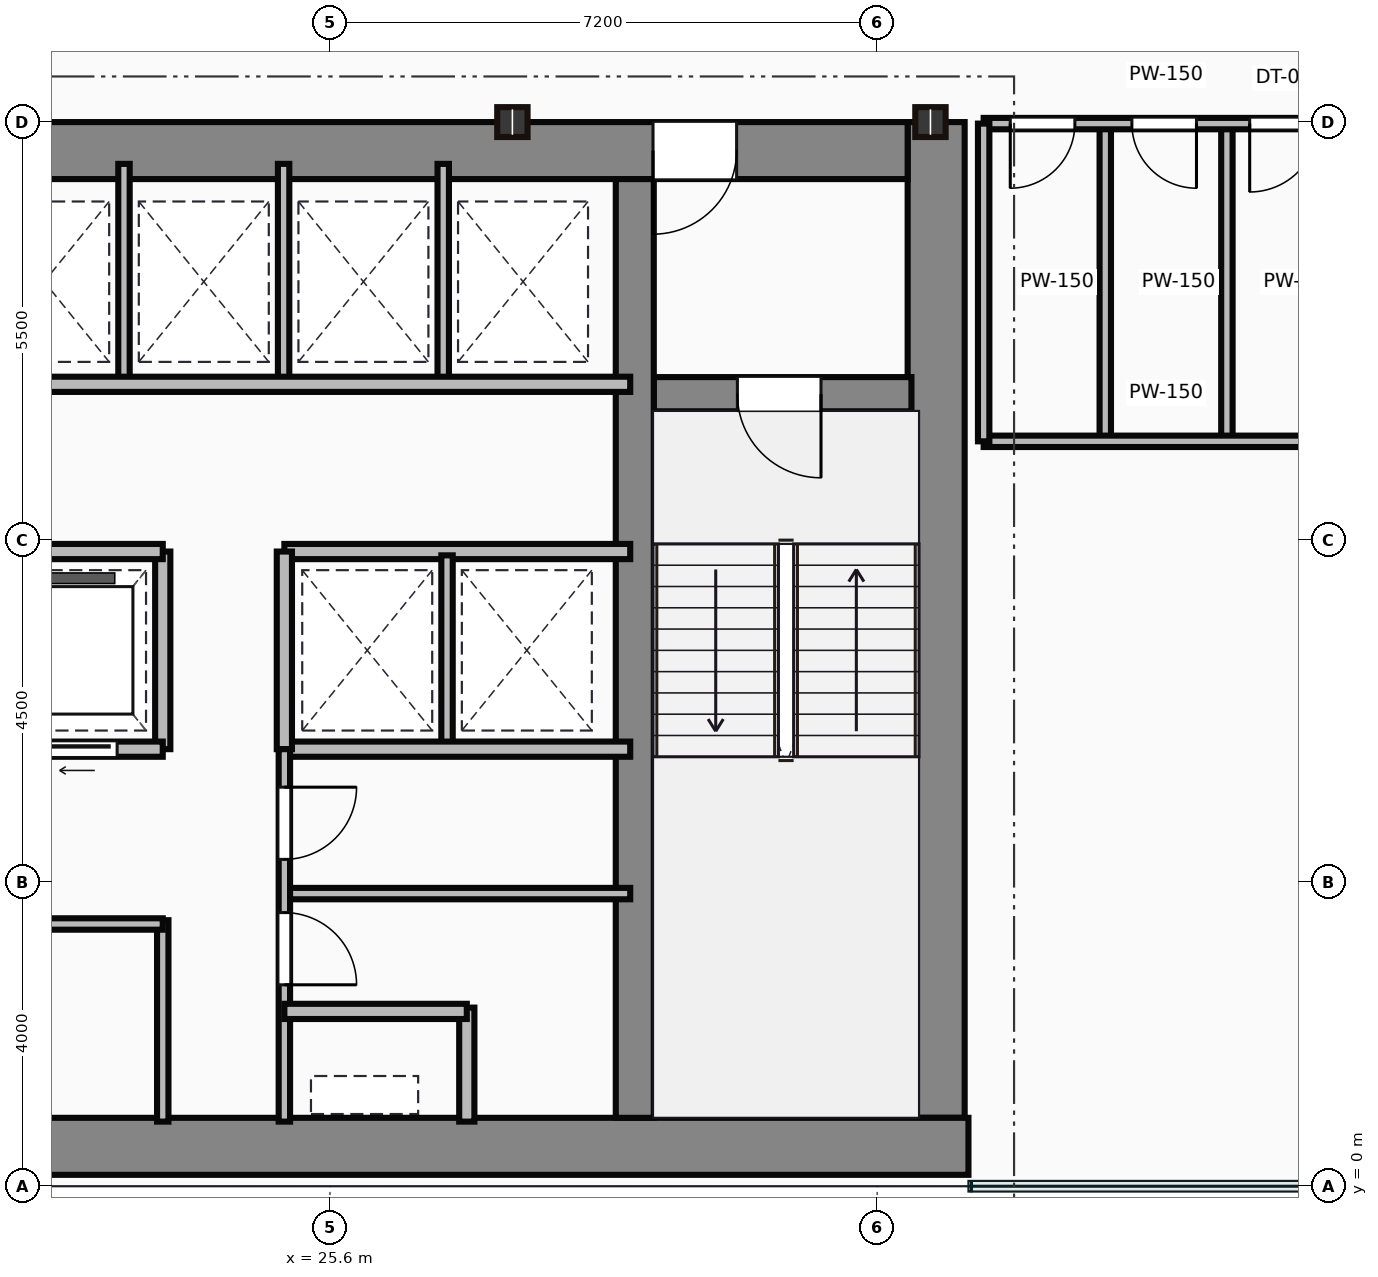
"""IFC4 building model, lengths in metres.
Left out: names, types, materials, properties, quantities, classifications, styles, units other than length and angle.
Written with IfcOpenShell. Run it as: python <this file> out.ifc"""

import sys

from ifc_helpers import new_model, si_unit, direction, frame, frame_2d, origin, origin_2d, place, context, subcontext, project, spatial, rectangle, i_section, extrude, source, transform, mapped, element, fill, save


model = new_model("IFC4")
c1 = context("Model", 3, precision=1e-05, world=origin(), true_north=direction((0.0, 1.0)))
c2 = subcontext(c1, "Body", "Model", "MODEL_VIEW")
j1 = project(units=[si_unit("LENGTHUNIT", "METRE"), si_unit("PLANEANGLEUNIT", "RADIAN")], contexts=[c1])
p1 = place(None, origin())
s1 = spatial("IfcSite", under=j1, at=p1, CompositionType="ELEMENT")
p2 = place(p1, origin())
s2 = spatial("IfcBuilding", under=s1, at=p2, CompositionType="ELEMENT")
p3 = place(p2, frame((0.0, 0.0, 125.15)))
s3 = spatial("IfcBuildingStorey", under=s2, at=p3, CompositionType="ELEMENT", Elevation=125.15)
m1 = source(origin(), c2, "Body", "SweptSolid", [
    extrude(rectangle(XDim=29.5, YDim=0.75, at=frame_2d((14.75, 0.0))), origin(), (0.0, 0.0, 1.0), 3.65),
])
p4 = place(p3, frame((4.5, 0.525, 0.0), z_axis=(0.0, 0.0, 1.0), x_axis=(1.0, 0.0, 0.0)))
e1 = element("IfcWall", 1, at=p4, inside=s3, PredefinedType="SHEAR", context=c2, shape_type="MappedRepresentation", body=[
    mapped(m1, transform((0.0, 0.0, 0.0))),
])
m2 = source(origin(), c2, "Body", "SweptSolid", [
    extrude(rectangle(XDim=13.1, YDim=0.75, at=frame_2d((6.55, 0.0))), origin(), (0.0, 0.0, 1.0), 3.65),
])
p5 = place(p3, frame((33.575, 0.9, 0.0), z_axis=(0.0, 0.0, 1.0), x_axis=(0.0, 1.0, 0.0)))
e2 = element("IfcWall", 2, at=p5, inside=s3, PredefinedType="SHEAR", context=c2, shape_type="MappedRepresentation", body=[
    mapped(m2, transform((0.0, 0.0, 0.0))),
])
m3 = source(origin(), c2, "Body", "SweptSolid", [
    extrude(rectangle(XDim=12.6, YDim=0.75, at=frame_2d((6.3, 0.0))), origin(), (0.0, 0.0, 1.0), 3.65),
])
p6 = place(p3, frame((20.6, 13.625, 0.0), z_axis=(0.0, 0.0, 1.0), x_axis=(1.0, 0.0, 0.0)))
e3 = element("IfcWall", 3, at=p6, inside=s3, PredefinedType="SHEAR", context=c2, shape_type="MappedRepresentation", body=[
    mapped(m3, transform((0.0, 0.0, 0.0))),
])
p7 = place(p6, frame((9.25, 0.0, 0.0)))
e4 = element("IfcOpeningElement", 4, at=p7, cuts=e3, PredefinedType="OPENING", context=c2, shape_type="SweptSolid", body=[
    extrude(rectangle(XDim=1.1, YDim=2.15, at=frame_2d((0.55, 1.075))), frame((0.0, 0.385, 0.0), z_axis=(0.0, -1.0, 0.0), x_axis=(1.0, 0.0, 0.0)), (0.0, 0.0, 1.0), 0.77),
])
m4 = source(origin(), c2, "Body", "SweptSolid", [
    extrude(rectangle(XDim=12.35, YDim=0.5, at=frame_2d((6.175, 0.0))), origin(), (0.0, 0.0, 1.0), 3.65),
])
p8 = place(p3, frame((29.61, 0.9, 0.0), z_axis=(0.0, 0.0, 1.0), x_axis=(0.0, 1.0, 0.0)))
e5 = element("IfcWall", 5, at=p8, inside=s3, PredefinedType="SHEAR", context=c2, shape_type="MappedRepresentation", body=[
    mapped(m4, transform((0.0, 0.0, 0.0))),
])
m5 = source(origin(), c2, "Body", "SweptSolid", [
    extrude(rectangle(XDim=3.39, YDim=0.45, at=frame_2d((1.695, 0.0))), origin(), (0.0, 0.0, 1.0), 3.65),
])
p9 = place(p3, frame((29.86, 10.42, 0.0), z_axis=(0.0, 0.0, 1.0), x_axis=(1.0, 0.0, 0.0)))
e6 = element("IfcWall", 6, at=p9, inside=s3, PredefinedType="SHEAR", context=c2, shape_type="MappedRepresentation", body=[
    mapped(m5, transform((0.0, 0.0, 0.0))),
])
p10 = place(p9, frame((1.1, 0.0, 0.0)))
e7 = element("IfcOpeningElement", 7, at=p10, cuts=e6, PredefinedType="OPENING", context=c2, shape_type="SweptSolid", body=[
    extrude(rectangle(XDim=1.1, YDim=2.15, at=frame_2d((0.55, 1.075))), frame((0.0, 0.235, 0.0), z_axis=(0.0, -1.0, 0.0), x_axis=(1.0, 0.0, 0.0)), (0.0, 0.0, 1.0), 0.47),
])
m6 = source(origin(), c2, "Body", "SweptSolid", [
    extrude(i_section(OverallWidth=0.399, OverallDepth=0.393, WebThickness=0.023, FlangeThickness=0.037, at=origin_2d()), origin(), (0.0, 0.0, 1.0), 3.65),
])
for number, where, z_axis, x_axis in (
    (8, (28.0, 14.0, 0.0), (0.0, 0.0, 1.0), (1.0, 0.0, 0.0)),
    (9, (33.5, 14.0, 0.0), (0.0, 0.0, 1.0), (1.0, 0.0, 0.0)),
):
    element("IfcColumn", number, at=place(p3, frame(where, z_axis=z_axis, x_axis=x_axis)), inside=s3, PredefinedType="COLUMN", context=c2, shape_type="MappedRepresentation", body=[
        mapped(m6, transform((0.0, 0.0, 0.0))),
    ])
m7 = source(origin(), c2, "Body", "SweptSolid", [
    extrude(rectangle(XDim=10.35, YDim=0.15, at=frame_2d((5.175, 0.0))), origin(), (0.0, 0.0, 1.0), 3.4),
])
p11 = place(p3, frame((13.05, 3.45, 0.0), z_axis=(0.0, 0.0, 1.0), x_axis=(1.0, 0.0, 0.0)))
e10 = element("IfcWall", 10, at=p11, inside=s3, PredefinedType="PARTITIONING", context=c2, shape_type="MappedRepresentation", body=[
    mapped(m7, transform((0.0, 0.0, 0.0))),
])
p12 = place(p11, frame((2.1, 0.0, 0.0)))
e11 = element("IfcOpeningElement", 11, at=p12, cuts=e10, PredefinedType="OPENING", context=c2, shape_type="SweptSolid", body=[
    extrude(rectangle(XDim=0.95, YDim=2.15, at=frame_2d((0.475, 1.075))), frame((0.0, 0.085, 0.0), z_axis=(0.0, -1.0, 0.0), x_axis=(1.0, 0.0, 0.0)), (0.0, 0.0, 1.0), 0.17),
])
p13 = place(p11, frame((6.8, 0.0, 0.0)))
e12 = element("IfcOpeningElement", 12, at=p13, cuts=e10, PredefinedType="OPENING", context=c2, shape_type="SweptSolid", body=[
    extrude(rectangle(XDim=0.95, YDim=2.15, at=frame_2d((0.475, 1.075))), frame((0.0, 0.085, 0.0), z_axis=(0.0, -1.0, 0.0), x_axis=(1.0, 0.0, 0.0)), (0.0, 0.0, 1.0), 0.17),
])
m8 = source(origin(), c2, "Body", "SweptSolid", [
    extrude(rectangle(XDim=2.65, YDim=0.15, at=frame_2d((1.325, 0.0))), origin(), (0.0, 0.0, 1.0), 3.4),
])
p14 = place(p3, frame((23.4, 0.85, 0.0), z_axis=(0.0, 0.0, 1.0), x_axis=(0.0, 1.0, 0.0)))
e13 = element("IfcWall", 13, at=p14, inside=s3, PredefinedType="PARTITIONING", context=c2, shape_type="MappedRepresentation", body=[
    mapped(m8, transform((0.0, 0.0, 0.0))),
])
m9 = source(origin(), c2, "Body", "SweptSolid", [
    extrude(rectangle(XDim=11.85, YDim=0.2, at=frame_2d((5.925, 0.0))), origin(), (0.0, 0.0, 1.0), 3.4),
])
p15 = place(p3, frame((11.55, 5.75, 0.0), z_axis=(0.0, 0.0, 1.0), x_axis=(1.0, 0.0, 0.0)))
e14 = element("IfcWall", 14, at=p15, inside=s3, PredefinedType="PARTITIONING", context=c2, shape_type="MappedRepresentation", body=[
    mapped(m9, transform((0.0, 0.0, 0.0))),
])
p16 = place(p15, frame((0.45, 0.0, 0.0)))
e15 = element("IfcOpeningElement", 15, at=p16, cuts=e14, PredefinedType="OPENING", context=c2, shape_type="SweptSolid", body=[
    extrude(rectangle(XDim=1.05, YDim=2.15, at=frame_2d((0.525, 1.075))), frame((0.0, 0.11, 0.0), z_axis=(0.0, -1.0, 0.0), x_axis=(1.0, 0.0, 0.0)), (0.0, 0.0, 1.0), 0.22),
])
p17 = place(p15, frame((2.4, 0.0, 0.0)))
e16 = element("IfcOpeningElement", 16, at=p17, cuts=e14, PredefinedType="OPENING", context=c2, shape_type="SweptSolid", body=[
    extrude(rectangle(XDim=1.05, YDim=2.15, at=frame_2d((0.525, 1.075))), frame((0.0, 0.11, 0.0), z_axis=(0.0, -1.0, 0.0), x_axis=(1.0, 0.0, 0.0)), (0.0, 0.0, 1.0), 0.22),
])
p18 = place(p15, frame((4.35, 0.0, 0.0)))
e17 = element("IfcOpeningElement", 17, at=p18, cuts=e14, PredefinedType="OPENING", context=c2, shape_type="SweptSolid", body=[
    extrude(rectangle(XDim=1.05, YDim=2.15, at=frame_2d((0.525, 1.075))), frame((0.0, 0.11, 0.0), z_axis=(0.0, -1.0, 0.0), x_axis=(1.0, 0.0, 0.0)), (0.0, 0.0, 1.0), 0.22),
])
p19 = place(p15, frame((6.3, 0.0, 0.0)))
e18 = element("IfcOpeningElement", 18, at=p19, cuts=e14, PredefinedType="OPENING", context=c2, shape_type="SweptSolid", body=[
    extrude(rectangle(XDim=1.05, YDim=2.15, at=frame_2d((0.525, 1.075))), frame((0.0, 0.11, 0.0), z_axis=(0.0, -1.0, 0.0), x_axis=(1.0, 0.0, 0.0)), (0.0, 0.0, 1.0), 0.22),
])
p20 = place(p15, frame((8.25, 0.0, 0.0)))
e19 = element("IfcOpeningElement", 19, at=p20, cuts=e14, PredefinedType="OPENING", context=c2, shape_type="SweptSolid", body=[
    extrude(rectangle(XDim=1.05, YDim=2.15, at=frame_2d((0.525, 1.075))), frame((0.0, 0.11, 0.0), z_axis=(0.0, -1.0, 0.0), x_axis=(1.0, 0.0, 0.0)), (0.0, 0.0, 1.0), 0.22),
])
p21 = place(p15, frame((10.2, 0.0, 0.0)))
e20 = element("IfcOpeningElement", 20, at=p21, cuts=e14, PredefinedType="OPENING", context=c2, shape_type="SweptSolid", body=[
    extrude(rectangle(XDim=1.05, YDim=2.15, at=frame_2d((0.525, 1.075))), frame((0.0, 0.11, 0.0), z_axis=(0.0, -1.0, 0.0), x_axis=(1.0, 0.0, 0.0)), (0.0, 0.0, 1.0), 0.22),
])
p22 = place(p3, frame((11.55, 8.35, 0.0), z_axis=(0.0, 0.0, 1.0), x_axis=(1.0, 0.0, 0.0)))
e21 = element("IfcWall", 21, at=p22, inside=s3, PredefinedType="PARTITIONING", context=c2, shape_type="MappedRepresentation", body=[
    mapped(m9, transform((0.0, 0.0, 0.0))),
])
m10 = source(origin(), c2, "Body", "SweptSolid", [
    extrude(rectangle(XDim=2.6, YDim=0.2, at=frame_2d((1.3, 0.0))), origin(), (0.0, 0.0, 1.0), 3.4),
])
p23 = place(p3, frame((23.4, 5.75, 0.0), z_axis=(0.0, 0.0, 1.0), x_axis=(0.0, 1.0, 0.0)))
e22 = element("IfcWall", 22, at=p23, inside=s3, PredefinedType="PARTITIONING", context=c2, shape_type="MappedRepresentation", body=[
    mapped(m10, transform((0.0, 0.0, 0.0))),
])
m11 = source(origin(), c2, "Body", "SweptSolid", [
    extrude(rectangle(XDim=8.8, YDim=0.2, at=frame_2d((4.4, 0.0))), origin(), (0.0, 0.0, 1.0), 3.4),
])
p24 = place(p3, frame((20.75, 10.55, 0.0), z_axis=(0.0, 0.0, 1.0), x_axis=(1.0, 0.0, 0.0)))
e23 = element("IfcWall", 23, at=p24, inside=s3, PredefinedType="PARTITIONING", context=c2, shape_type="MappedRepresentation", body=[
    mapped(m11, transform((0.0, 0.0, 0.0))),
])
m12 = source(origin(), c2, "Body", "SweptSolid", [
    extrude(rectangle(XDim=2.85, YDim=0.15, at=frame_2d((1.425, 0.0))), origin(), (0.0, 0.0, 1.0), 3.4),
])
for number, where, z_axis, x_axis in (
    (24, (22.89, 10.6, 0.0), (0.0, 0.0, 1.0), (0.0, 1.0, 0.0)),
    (25, (24.99, 10.6, 0.0), (0.0, 0.0, 1.0), (0.0, 1.0, 0.0)),
    (26, (27.09, 10.6, 0.0), (0.0, 0.0, 1.0), (0.0, 1.0, 0.0)),
):
    element("IfcWall", number, at=place(p3, frame(where, z_axis=z_axis, x_axis=x_axis)), inside=s3, PredefinedType="PARTITIONING", context=c2, shape_type="MappedRepresentation", body=[
        mapped(m12, transform((0.0, 0.0, 0.0))),
    ])
m13 = source(origin(), c2, "Body", "SweptSolid", [
    extrude(rectangle(XDim=4.55, YDim=0.2, at=frame_2d((2.275, 0.0))), origin(), (0.0, 0.0, 1.0), 3.4),
])
for number, where, z_axis, x_axis in (
    (27, (25.0, 8.35, 0.0), (0.0, 0.0, 1.0), (1.0, 0.0, 0.0)),
    (28, (25.0, 5.75, 0.0), (0.0, 0.0, 1.0), (1.0, 0.0, 0.0)),
):
    element("IfcWall", number, at=place(p3, frame(where, z_axis=z_axis, x_axis=x_axis)), inside=s3, PredefinedType="PARTITIONING", context=c2, shape_type="MappedRepresentation", body=[
        mapped(m13, transform((0.0, 0.0, 0.0))),
    ])
p25 = place(p3, frame((25.0, 5.75, 0.0), z_axis=(0.0, 0.0, 1.0), x_axis=(0.0, 1.0, 0.0)))
e29 = element("IfcWall", 29, at=p25, inside=s3, PredefinedType="PARTITIONING", context=c2, shape_type="MappedRepresentation", body=[
    mapped(m10, transform((0.0, 0.0, 0.0))),
])
m14 = source(origin(), c2, "Body", "SweptSolid", [
    extrude(rectangle(XDim=2.5, YDim=0.15, at=frame_2d((1.25, 0.0))), origin(), (0.0, 0.0, 1.0), 3.4),
])
p26 = place(p3, frame((27.14, 5.8, 0.0), z_axis=(0.0, 0.0, 1.0), x_axis=(0.0, 1.0, 0.0)))
e30 = element("IfcWall", 30, at=p26, inside=s3, PredefinedType="PARTITIONING", context=c2, shape_type="MappedRepresentation", body=[
    mapped(m14, transform((0.0, 0.0, 0.0))),
])
m15 = source(origin(), c2, "Body", "SweptSolid", [
    extrude(rectangle(XDim=4.9, YDim=0.15, at=frame_2d((2.45, 0.0))), origin(), (0.0, 0.0, 1.0), 3.4),
])
p27 = place(p3, frame((25.0, 0.85, 0.0), z_axis=(0.0, 0.0, 1.0), x_axis=(0.0, 1.0, 0.0)))
e31 = element("IfcWall", 31, at=p27, inside=s3, PredefinedType="PARTITIONING", context=c2, shape_type="MappedRepresentation", body=[
    mapped(m15, transform((0.0, 0.0, 0.0))),
])
p28 = place(p27, frame((1.8, 0.0, 0.0)))
e32 = element("IfcOpeningElement", 32, at=p28, cuts=e31, PredefinedType="OPENING", context=c2, shape_type="SweptSolid", body=[
    extrude(rectangle(XDim=0.95, YDim=2.15, at=frame_2d((0.475, 1.075))), frame((0.0, 0.085, 0.0), z_axis=(0.0, -1.0, 0.0), x_axis=(1.0, 0.0, 0.0)), (0.0, 0.0, 1.0), 0.17),
])
p29 = place(p27, frame((3.45, 0.0, 0.0)))
e33 = element("IfcOpeningElement", 33, at=p29, cuts=e31, PredefinedType="OPENING", context=c2, shape_type="SweptSolid", body=[
    extrude(rectangle(XDim=0.95, YDim=2.15, at=frame_2d((0.475, 1.075))), frame((0.0, 0.085, 0.0), z_axis=(0.0, -1.0, 0.0), x_axis=(1.0, 0.0, 0.0)), (0.0, 0.0, 1.0), 0.17),
])
m16 = source(origin(), c2, "Body", "SweptSolid", [
    extrude(rectangle(XDim=2.4, YDim=0.2, at=frame_2d((1.2, 0.0))), origin(), (0.0, 0.0, 1.0), 3.4),
])
p30 = place(p3, frame((25.0, 2.3, 0.0), z_axis=(0.0, 0.0, 1.0), x_axis=(1.0, 0.0, 0.0)))
e34 = element("IfcWall", 34, at=p30, inside=s3, PredefinedType="PARTITIONING", context=c2, shape_type="MappedRepresentation", body=[
    mapped(m16, transform((0.0, 0.0, 0.0))),
])
m17 = source(origin(), c2, "Body", "SweptSolid", [
    extrude(rectangle(XDim=1.5, YDim=0.2, at=frame_2d((0.75, 0.0))), origin(), (0.0, 0.0, 1.0), 3.4),
])
p31 = place(p3, frame((27.4, 0.85, 0.0), z_axis=(0.0, 0.0, 1.0), x_axis=(0.0, 1.0, 0.0)))
e35 = element("IfcWall", 35, at=p31, inside=s3, PredefinedType="PARTITIONING", context=c2, shape_type="MappedRepresentation", body=[
    mapped(m17, transform((0.0, 0.0, 0.0))),
])
m18 = source(origin(), c2, "Body", "SweptSolid", [
    extrude(rectangle(XDim=4.55, YDim=0.15, at=frame_2d((2.275, 0.0))), origin(), (0.0, 0.0, 1.0), 3.4),
])
p32 = place(p3, frame((25.0, 3.85, 0.0), z_axis=(0.0, 0.0, 1.0), x_axis=(1.0, 0.0, 0.0)))
e36 = element("IfcWall", 36, at=p32, inside=s3, PredefinedType="PARTITIONING", context=c2, shape_type="MappedRepresentation", body=[
    mapped(m18, transform((0.0, 0.0, 0.0))),
])
m19 = source(origin(), c2, "Body", "SweptSolid", [
    extrude(rectangle(XDim=4.8, YDim=0.15, at=frame_2d((2.4, 0.0))), origin(), (0.0, 0.0, 1.0), 2.702),
])
p33 = place(p3, frame((34.2, 13.98, 0.0), z_axis=(0.0, 0.0, 1.0), x_axis=(1.0, 0.0, 0.0)))
e37 = element("IfcWall", 37, at=p33, inside=s3, PredefinedType="PARTITIONING", context=c2, shape_type="MappedRepresentation", body=[
    mapped(m19, transform((0.0, 0.0, 0.0))),
])
p34 = place(p33, frame((0.35, 0.0, 0.0)))
e38 = element("IfcOpeningElement", 38, at=p34, cuts=e37, PredefinedType="OPENING", context=c2, shape_type="SweptSolid", body=[
    extrude(rectangle(XDim=0.85, YDim=2.1, at=frame_2d((0.425, 1.05))), frame((0.0, 0.085, 0.0), z_axis=(0.0, -1.0, 0.0), x_axis=(1.0, 0.0, 0.0)), (0.0, 0.0, 1.0), 0.17),
])
p35 = place(p33, frame((1.95, 0.0, 0.0)))
e39 = element("IfcOpeningElement", 39, at=p35, cuts=e37, PredefinedType="OPENING", context=c2, shape_type="SweptSolid", body=[
    extrude(rectangle(XDim=0.85, YDim=2.1, at=frame_2d((0.425, 1.05))), frame((0.0, 0.085, 0.0), z_axis=(0.0, -1.0, 0.0), x_axis=(1.0, 0.0, 0.0)), (0.0, 0.0, 1.0), 0.17),
])
p36 = place(p33, frame((3.5, 0.0, 0.0)))
e40 = element("IfcOpeningElement", 40, at=p36, cuts=e37, PredefinedType="OPENING", context=c2, shape_type="SweptSolid", body=[
    extrude(rectangle(XDim=0.9, YDim=2.1, at=frame_2d((0.45, 1.05))), frame((0.0, 0.085, 0.0), z_axis=(0.0, -1.0, 0.0), x_axis=(1.0, 0.0, 0.0)), (0.0, 0.0, 1.0), 0.17),
])
m20 = source(origin(), c2, "Body", "SweptSolid", [
    extrude(rectangle(XDim=4.8, YDim=0.15, at=frame_2d((2.4, 0.0))), origin(), (0.0, 0.0, 1.0), 3.4),
])
p37 = place(p3, frame((34.2, 9.8, 0.0), z_axis=(0.0, 0.0, 1.0), x_axis=(1.0, 0.0, 0.0)))
e41 = element("IfcWall", 41, at=p37, inside=s3, PredefinedType="PARTITIONING", context=c2, shape_type="MappedRepresentation", body=[
    mapped(m20, transform((0.0, 0.0, 0.0))),
])
m21 = source(origin(), c2, "Body", "SweptSolid", [
    extrude(rectangle(XDim=4.18, YDim=0.15, at=frame_2d((2.09, 0.0))), origin(), (0.0, 0.0, 1.0), 3.4),
])
for number, where, z_axis, x_axis in (
    (42, (34.2, 9.8, 0.0), (0.0, 0.0, 1.0), (0.0, 1.0, 0.0)),
    (43, (35.8, 9.8, 0.0), (0.0, 0.0, 1.0), (0.0, 1.0, 0.0)),
    (44, (37.4, 9.8, 0.0), (0.0, 0.0, 1.0), (0.0, 1.0, 0.0)),
):
    element("IfcWall", number, at=place(p3, frame(where, z_axis=z_axis, x_axis=x_axis)), inside=s3, PredefinedType="PARTITIONING", context=c2, shape_type="MappedRepresentation", body=[
        mapped(m21, transform((0.0, 0.0, 0.0))),
    ])
m22 = source(origin(), c2, "Body", "SweptSolid", [
    extrude(rectangle(XDim=1.1, YDim=2.15, at=frame_2d((0.55, 1.075))), frame((0.0, 0.025, 0.0), z_axis=(0.0, -1.0, 0.0), x_axis=(1.0, 0.0, 0.0)), (0.0, 0.0, 1.0), 0.05),
])
p38 = place(p10, frame((1.1, 0.0, 0.0), z_axis=(0.0, 0.0, 1.0), x_axis=(-1.0, 0.0, 0.0)))
e45 = element("IfcDoor", 45, at=p38, inside=s3, OperationType="SINGLE_SWING_RIGHT", PredefinedType="DOOR", context=c2, shape_type="MappedRepresentation", body=[
    mapped(m22, transform((0.0, 0.0, 0.0))),
])
fill(e7, e45)
p39 = place(p7, origin())
e46 = element("IfcDoor", 46, at=p39, inside=s3, OperationType="SINGLE_SWING_LEFT", PredefinedType="DOOR", context=c2, shape_type="MappedRepresentation", body=[
    mapped(m22, transform((0.0, 0.0, 0.0))),
])
fill(e4, e46)
m23 = source(origin(), c2, "Body", "SweptSolid", [
    extrude(rectangle(XDim=1.05, YDim=2.15, at=frame_2d((0.525, 1.075))), frame((0.0, 0.025, 0.0), z_axis=(0.0, -1.0, 0.0), x_axis=(1.0, 0.0, 0.0)), (0.0, 0.0, 1.0), 0.05),
])
p40 = place(p21, frame((1.05, 0.0, 0.0), z_axis=(0.0, 0.0, 1.0), x_axis=(-1.0, 0.0, 0.0)))
e47 = element("IfcDoor", 47, at=p40, inside=s3, OperationType="SLIDING_TO_LEFT", PredefinedType="DOOR", context=c2, shape_type="MappedRepresentation", body=[
    mapped(m23, transform((0.0, 0.0, 0.0))),
])
fill(e20, e47)
m24 = source(origin(), c2, "Body", "SweptSolid", [
    extrude(rectangle(XDim=0.95, YDim=2.15, at=frame_2d((0.475, 1.075))), frame((0.0, 0.025, 0.0), z_axis=(0.0, -1.0, 0.0), x_axis=(1.0, 0.0, 0.0)), (0.0, 0.0, 1.0), 0.05),
])
p41 = place(p28, origin())
e48 = element("IfcDoor", 48, at=p41, inside=s3, OperationType="SINGLE_SWING_LEFT", PredefinedType="DOOR", context=c2, shape_type="MappedRepresentation", body=[
    mapped(m24, transform((0.0, 0.0, 0.0))),
])
fill(e32, e48)
p42 = place(p29, origin())
e49 = element("IfcDoor", 49, at=p42, inside=s3, OperationType="SINGLE_SWING_RIGHT", PredefinedType="DOOR", context=c2, shape_type="MappedRepresentation", body=[
    mapped(m24, transform((0.0, 0.0, 0.0))),
])
fill(e33, e49)
m25 = source(origin(), c2, "Body", "SweptSolid", [
    extrude(rectangle(XDim=0.85, YDim=2.1, at=frame_2d((0.425, 1.05))), frame((0.0, 0.025, 0.0), z_axis=(0.0, -1.0, 0.0), x_axis=(1.0, 0.0, 0.0)), (0.0, 0.0, 1.0), 0.05),
])
p43 = place(p34, frame((0.85, 0.0, 0.0), z_axis=(0.0, 0.0, 1.0), x_axis=(-1.0, 0.0, 0.0)))
e50 = element("IfcDoor", 50, at=p43, inside=s3, OperationType="SINGLE_SWING_LEFT", PredefinedType="DOOR", context=c2, shape_type="MappedRepresentation", body=[
    mapped(m25, transform((0.0, 0.0, 0.0))),
])
fill(e38, e50)
p44 = place(p35, frame((0.85, 0.0, 0.0), z_axis=(0.0, 0.0, 1.0), x_axis=(-1.0, 0.0, 0.0)))
e51 = element("IfcDoor", 51, at=p44, inside=s3, OperationType="SINGLE_SWING_RIGHT", PredefinedType="DOOR", context=c2, shape_type="MappedRepresentation", body=[
    mapped(m25, transform((0.0, 0.0, 0.0))),
])
fill(e39, e51)
m26 = source(origin(), c2, "Body", "SweptSolid", [
    extrude(rectangle(XDim=0.9, YDim=2.1, at=frame_2d((0.45, 1.05))), frame((0.0, 0.025, 0.0), z_axis=(0.0, -1.0, 0.0), x_axis=(1.0, 0.0, 0.0)), (0.0, 0.0, 1.0), 0.05),
])
p45 = place(p36, frame((0.9, 0.0, 0.0), z_axis=(0.0, 0.0, 1.0), x_axis=(-1.0, 0.0, 0.0)))
e52 = element("IfcDoor", 52, at=p45, inside=s3, OperationType="SINGLE_SWING_LEFT", PredefinedType="DOOR", context=c2, shape_type="MappedRepresentation", body=[
    mapped(m26, transform((0.0, 0.0, 0.0))),
])
fill(e40, e52)
save(model, sys.argv[1])
